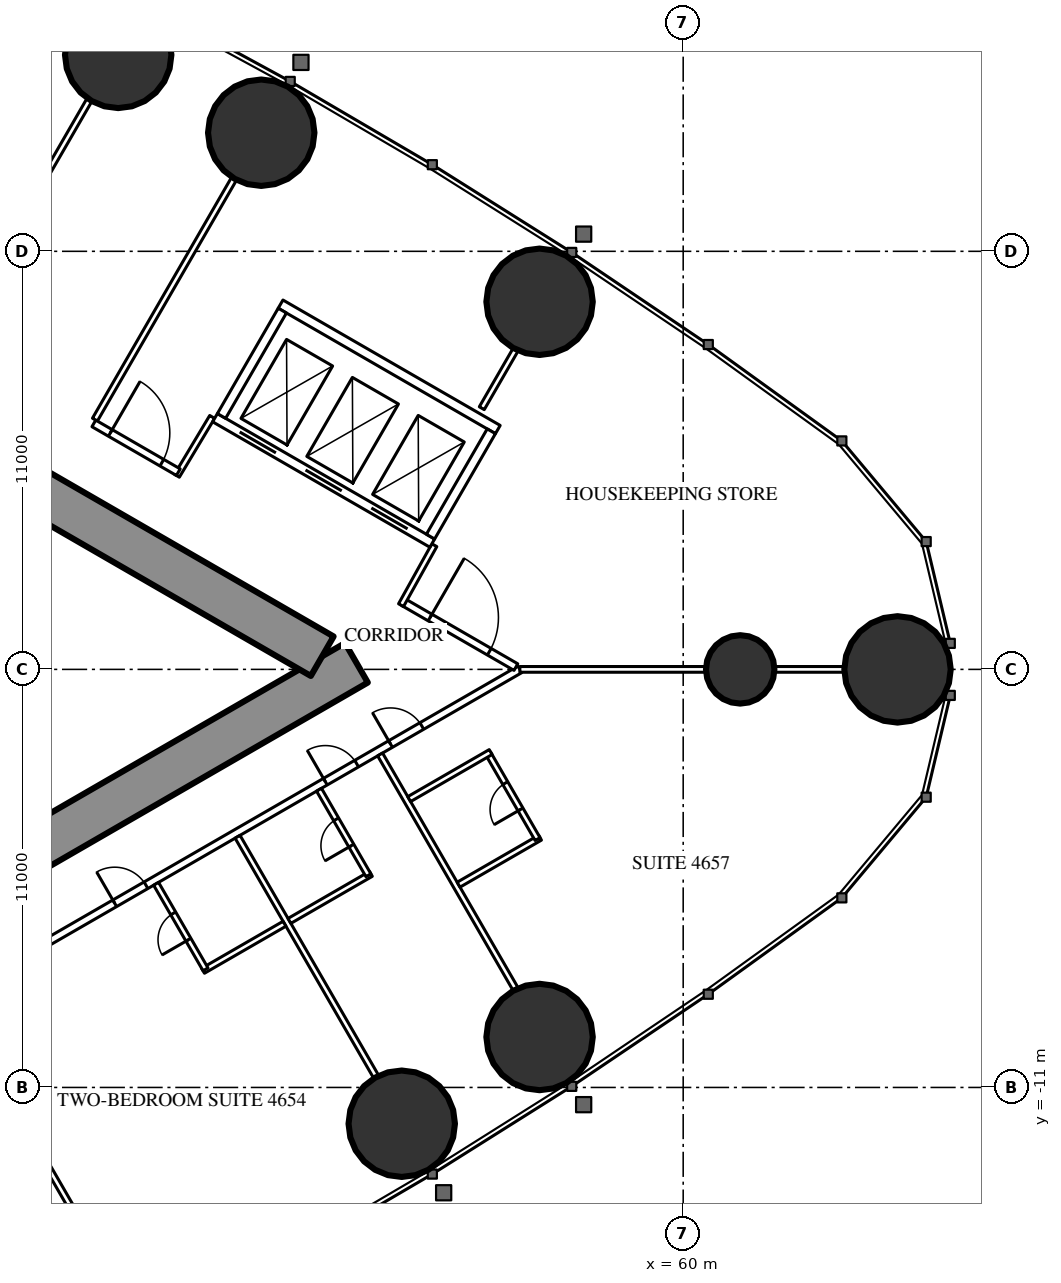
"""IFC4 building model, lengths in metres.
Left out: names, types, materials, properties, quantities, classifications, styles, units other than length and angle.
Written with IfcOpenShell. Run it as: python <this file> out.ifc"""

import sys

from ifc_helpers import new_model, si_unit, direction, frame, frame_2d, origin, origin_2d, place, context, subcontext, project, spatial, rectangle, circle, extrude, element, fill, save


model = new_model("IFC4")
c1 = context("Model", 3, precision=1e-05, world=origin(), true_north=direction((0.0, 1.0)))
c2 = subcontext(c1, "Body", "Model", "MODEL_VIEW")
j1 = project(units=[si_unit("LENGTHUNIT", "METRE"), si_unit("PLANEANGLEUNIT", "RADIAN")], contexts=[c1])
p1 = place(None, origin())
s1 = spatial("IfcSite", under=j1, at=p1, CompositionType="ELEMENT")
p2 = place(p1, origin())
s2 = spatial("IfcBuilding", under=s1, at=p2, CompositionType="ELEMENT")
p3 = place(p2, frame((0.0, 0.0, 173.8)))
s3 = spatial("IfcBuildingStorey", under=s2, at=p3, CompositionType="ELEMENT", Elevation=173.8)
for number, where, z_axis, x_axis in (
    (1, (65.64, 0.0, 0.0), (0.0, 0.0, 1.0), (1.0, 0.0, 0.0)),
    (2, (56.221, 9.672, 0.0), (0.0, 0.0, 1.0), (1.0, 0.0, 0.0)),
    (3, (48.897, 14.121, 0.0), (0.0, 0.0, 1.0), (1.0, 0.0, 0.0)),
    (4, (45.134, 16.168, 0.0), (0.0, 0.0, 1.0), (1.0, 0.0, 0.0)),
    (5, (52.594, -11.955, 0.0), (0.0, 0.0, 1.0), (1.0, 0.0, 0.0)),
    (6, (56.221, -9.672, 0.0), (0.0, 0.0, 1.0), (1.0, 0.0, 0.0)),
):
    element("IfcColumn", number, at=place(p3, frame(where, z_axis=z_axis, x_axis=x_axis)), inside=s3, PredefinedType="COLUMN", context=c2, shape_type="SweptSolid", body=[
        extrude(circle(Radius=1.4, at=origin_2d()), origin(), (0.0, 0.0, 1.0), 3.5),
    ])
p4 = place(p3, frame((61.5, 0.0, 0.0), z_axis=(0.0, 0.0, 1.0), x_axis=(1.0, 0.0, 0.0)))
e7 = element("IfcColumn", 7, at=p4, inside=s3, PredefinedType="COLUMN", context=c2, shape_type="SweptSolid", body=[
    extrude(circle(Radius=0.9, at=origin_2d()), origin(), (0.0, 0.0, 1.0), 3.5),
])
p5 = place(p3, frame((27.2, -13.8, 0.0), z_axis=(0.0, 0.0, 1.0), x_axis=(0.866027159892, 0.499996958321, 0.0)))
e8 = element("IfcWall", 8, at=p5, inside=s3, PredefinedType="SHEAR", context=c2, shape_type="SweptSolid", body=[
    extrude(rectangle(XDim=27.947, YDim=1.2, at=frame_2d((13.973, 0.0))), origin(), (0.0, 0.0, 1.0), 3.5),
])
p6 = place(p5, frame((4.6, 0.0, 0.0)))
e9 = element("IfcOpeningElement", 9, at=p6, cuts=e8, PredefinedType="OPENING", context=c2, shape_type="SweptSolid", body=[
    extrude(rectangle(XDim=1.0, YDim=2.2, at=frame_2d((0.5, 1.1))), frame((0.0, 0.61, 0.0), z_axis=(0.0, -1.0, 0.0), x_axis=(1.0, 0.0, 0.0)), (0.0, 0.0, 1.0), 1.22),
])
p7 = place(p5, frame((13.395, 0.0, 0.0)))
e10 = element("IfcOpeningElement", 10, at=p7, cuts=e8, PredefinedType="OPENING", context=c2, shape_type="SweptSolid", body=[
    extrude(rectangle(XDim=1.8, YDim=2.2, at=frame_2d((0.9, 1.1))), frame((0.0, 0.61, 0.0), z_axis=(0.0, -1.0, 0.0), x_axis=(1.0, 0.0, 0.0)), (0.0, 0.0, 1.0), 1.22),
])
p8 = place(p3, frame((27.2, 13.8, 0.0), z_axis=(0.0, 0.0, 1.0), x_axis=(0.866024515034, -0.500001539357, 0.0)))
e11 = element("IfcWall", 11, at=p8, inside=s3, PredefinedType="SHEAR", context=c2, shape_type="SweptSolid", body=[
    extrude(rectangle(XDim=26.907, YDim=1.2, at=frame_2d((13.454, 0.0))), origin(), (0.0, 0.0, 1.0), 3.5),
])
p9 = place(p8, frame((4.6, 0.0, 0.0)))
e12 = element("IfcOpeningElement", 12, at=p9, cuts=e11, PredefinedType="OPENING", context=c2, shape_type="SweptSolid", body=[
    extrude(rectangle(XDim=1.0, YDim=2.2, at=frame_2d((0.5, 1.1))), frame((0.0, 0.61, 0.0), z_axis=(0.0, -1.0, 0.0), x_axis=(1.0, 0.0, 0.0)), (0.0, 0.0, 1.0), 1.22),
])
p10 = place(p8, frame((13.395, 0.0, 0.0)))
e13 = element("IfcOpeningElement", 13, at=p10, cuts=e11, PredefinedType="OPENING", context=c2, shape_type="SweptSolid", body=[
    extrude(rectangle(XDim=1.8, YDim=2.2, at=frame_2d((0.9, 1.1))), frame((0.0, 0.61, 0.0), z_axis=(0.0, -1.0, 0.0), x_axis=(1.0, 0.0, 0.0)), (0.0, 0.0, 1.0), 1.22),
])
p11 = place(p3, frame((27.959, -16.017, 0.0), z_axis=(0.0, 0.0, 1.0), x_axis=(0.866024151371, 0.500002169237, 0.0)))
e14 = element("IfcWall", 14, at=p11, inside=s3, PredefinedType="PARTITIONING", context=c2, shape_type="SweptSolid", body=[
    extrude(rectangle(XDim=32.034, YDim=0.2, at=frame_2d((16.017, 0.0))), origin(), (0.0, 0.0, 1.0), 3.25),
])
p12 = place(p11, frame((4.765, 0.0, 0.0)))
e15 = element("IfcOpeningElement", 15, at=p12, cuts=e14, PredefinedType="OPENING", context=c2, shape_type="SweptSolid", body=[
    extrude(rectangle(XDim=0.95, YDim=2.2, at=frame_2d((0.475, 1.1))), frame((0.0, 0.11, 0.0), z_axis=(0.0, -1.0, 0.0), x_axis=(1.0, 0.0, 0.0)), (0.0, 0.0, 1.0), 0.22),
])
p13 = place(p11, frame((9.215, 0.0, 0.0)))
e16 = element("IfcOpeningElement", 16, at=p13, cuts=e14, PredefinedType="OPENING", context=c2, shape_type="SweptSolid", body=[
    extrude(rectangle(XDim=1.0, YDim=2.2, at=frame_2d((0.5, 1.1))), frame((0.0, 0.11, 0.0), z_axis=(0.0, -1.0, 0.0), x_axis=(1.0, 0.0, 0.0)), (0.0, 0.0, 1.0), 0.22),
])
p14 = place(p11, frame((19.725, 0.0, 0.0)))
e17 = element("IfcOpeningElement", 17, at=p14, cuts=e14, PredefinedType="OPENING", context=c2, shape_type="SweptSolid", body=[
    extrude(rectangle(XDim=0.95, YDim=2.2, at=frame_2d((0.475, 1.1))), frame((0.0, 0.11, 0.0), z_axis=(0.0, -1.0, 0.0), x_axis=(1.0, 0.0, 0.0)), (0.0, 0.0, 1.0), 0.22),
])
p15 = place(p11, frame((26.125, 0.0, 0.0)))
e18 = element("IfcOpeningElement", 18, at=p15, cuts=e14, PredefinedType="OPENING", context=c2, shape_type="SweptSolid", body=[
    extrude(rectangle(XDim=0.95, YDim=2.2, at=frame_2d((0.475, 1.1))), frame((0.0, 0.11, 0.0), z_axis=(0.0, -1.0, 0.0), x_axis=(1.0, 0.0, 0.0)), (0.0, 0.0, 1.0), 0.22),
])
p16 = place(p11, frame((28.106, 0.0, 0.0)))
e19 = element("IfcOpeningElement", 19, at=p16, cuts=e14, PredefinedType="OPENING", context=c2, shape_type="SweptSolid", body=[
    extrude(rectangle(XDim=0.95, YDim=2.2, at=frame_2d((0.475, 1.1))), frame((0.0, 0.11, 0.0), z_axis=(0.0, -1.0, 0.0), x_axis=(1.0, 0.0, 0.0)), (0.0, 0.0, 1.0), 0.22),
])
p17 = place(p3, frame((40.769, -8.737, 0.0), z_axis=(0.0, 0.0, 1.0), x_axis=(0.500013115284, -0.866017831539, 0.0)))
e20 = element("IfcWall", 20, at=p17, inside=s3, PredefinedType="PARTITIONING", context=c2, shape_type="SweptSolid", body=[
    extrude(rectangle(XDim=7.198, YDim=0.15, at=frame_2d((3.599, 0.0))), origin(), (0.0, 0.0, 1.0), 2.3),
])
p18 = place(p3, frame((48.275, -4.404, 0.0), z_axis=(0.0, 0.0, 1.0), x_axis=(0.500006004368, -0.866021937133, 0.0)))
e21 = element("IfcWall", 21, at=p18, inside=s3, PredefinedType="PARTITIONING", context=c2, shape_type="SweptSolid", body=[
    extrude(rectangle(XDim=7.279, YDim=0.15, at=frame_2d((3.64, 0.0))), origin(), (0.0, 0.0, 1.0), 2.3),
])
p19 = place(p3, frame((52.025, -2.238, 0.0), z_axis=(0.0, 0.0, 1.0), x_axis=(0.499983785035, -0.866034765296, 0.0)))
e22 = element("IfcWall", 22, at=p19, inside=s3, PredefinedType="PARTITIONING", context=c2, shape_type="SweptSolid", body=[
    extrude(rectangle(XDim=7.116, YDim=0.15, at=frame_2d((3.558, 0.0))), origin(), (0.0, 0.0, 1.0), 2.3),
])
p20 = place(p3, frame((40.769, 8.737, 0.0), z_axis=(0.0, 0.0, 1.0), x_axis=(0.500013115284, 0.866017831539, 0.0)))
e23 = element("IfcWall", 23, at=p20, inside=s3, PredefinedType="PARTITIONING", context=c2, shape_type="SweptSolid", body=[
    extrude(rectangle(XDim=7.198, YDim=0.15, at=frame_2d((3.599, 0.0))), origin(), (0.0, 0.0, 1.0), 2.3),
])
p21 = place(p3, frame((44.521, 6.571, 0.0), z_axis=(0.0, 0.0, 1.0), x_axis=(0.500020376429, 0.866013639128, 0.0)))
e24 = element("IfcWall", 24, at=p21, inside=s3, PredefinedType="PARTITIONING", context=c2, shape_type="SweptSolid", body=[
    extrude(rectangle(XDim=7.306, YDim=0.15, at=frame_2d((3.653, 0.0))), origin(), (0.0, 0.0, 1.0), 2.3),
])
p22 = place(p3, frame((55.702, 0.0, 0.0), z_axis=(0.0, 0.0, 1.0), x_axis=(1.0, 0.0, 0.0)))
e25 = element("IfcWall", 25, at=p22, inside=s3, PredefinedType="PARTITIONING", context=c2, shape_type="SweptSolid", body=[
    extrude(rectangle(XDim=8.518, YDim=0.15, at=frame_2d((4.259, 0.0))), origin(), (0.0, 0.0, 1.0), 2.3),
])
p23 = place(p3, frame((54.7, 6.872, 0.0), z_axis=(0.0, 0.0, 1.0), x_axis=(0.499989690894, 0.866031355668, 0.0)))
e26 = element("IfcWall", 26, at=p23, inside=s3, PredefinedType="PARTITIONING", context=c2, shape_type="SweptSolid", body=[
    extrude(rectangle(XDim=1.766, YDim=0.15, at=frame_2d((0.883, 0.0))), origin(), (0.0, 0.0, 1.0), 3.25),
])
p24 = place(p3, frame((52.639, 1.769, 0.0), z_axis=(0.0, 0.0, 1.0), x_axis=(0.866027340901, -0.4999966448, 0.0)))
e27 = element("IfcWall", 27, at=p24, inside=s3, PredefinedType="PARTITIONING", context=c2, shape_type="SweptSolid", body=[
    extrude(rectangle(XDim=3.417, YDim=0.2, at=frame_2d((1.708, 0.0))), origin(), (0.0, 0.0, 1.0), 3.25),
])
p25 = place(p24, frame((0.809, 0.0, 0.0)))
e28 = element("IfcOpeningElement", 28, at=p25, cuts=e27, PredefinedType="OPENING", context=c2, shape_type="SweptSolid", body=[
    extrude(rectangle(XDim=1.8, YDim=2.2, at=frame_2d((0.9, 1.1))), frame((0.0, 0.11, 0.0), z_axis=(0.0, -1.0, 0.0), x_axis=(1.0, 0.0, 0.0)), (0.0, 0.0, 1.0), 0.22),
])
p26 = place(p3, frame((52.576, 1.689, 0.0), z_axis=(0.0, 0.0, 1.0), x_axis=(0.485424724123, 0.874278466629, 0.0)))
e29 = element("IfcWall", 29, at=p26, inside=s3, PredefinedType="PARTITIONING", context=c2, shape_type="SweptSolid", body=[
    extrude(rectangle(XDim=1.805, YDim=0.15, at=frame_2d((0.903, 0.0))), origin(), (0.0, 0.0, 1.0), 3.25),
])
p27 = place(p3, frame((47.606, 6.643, 0.0), z_axis=(0.0, 0.0, 1.0), x_axis=(-0.514237157483, -0.857648031458, 0.0)))
e30 = element("IfcWall", 30, at=p27, inside=s3, PredefinedType="PARTITIONING", context=c2, shape_type="SweptSolid", body=[
    extrude(rectangle(XDim=1.805, YDim=0.15, at=frame_2d((0.902, 0.0))), origin(), (0.0, 0.0, 1.0), 3.25),
])
p28 = place(p3, frame((44.493, 6.472, 0.0), z_axis=(0.0, 0.0, 1.0), x_axis=(0.866027140358, -0.499996992154, 0.0)))
e31 = element("IfcWall", 31, at=p28, inside=s3, PredefinedType="PARTITIONING", context=c2, shape_type="SweptSolid", body=[
    extrude(rectangle(XDim=2.566, YDim=0.2, at=frame_2d((1.283, 0.0))), origin(), (0.0, 0.0, 1.0), 3.25),
])
p29 = place(p28, frame((0.5, 0.0, 0.0)))
e32 = element("IfcOpeningElement", 32, at=p29, cuts=e31, PredefinedType="OPENING", context=c2, shape_type="SweptSolid", body=[
    extrude(rectangle(XDim=1.566, YDim=2.2, at=frame_2d((0.783, 1.1))), frame((0.0, 0.11, 0.0), z_axis=(0.0, -1.0, 0.0), x_axis=(1.0, 0.0, 0.0)), (0.0, 0.0, 1.0), 0.22),
])
p30 = place(p3, frame((47.366, -7.93, 0.0), z_axis=(0.0, 0.0, 1.0), x_axis=(0.866031185235, 0.4999899861, 0.0)))
e33 = element("IfcWall", 33, at=p30, inside=s3, PredefinedType="PARTITIONING", context=c2, shape_type="SweptSolid", body=[
    extrude(rectangle(XDim=2.475, YDim=0.15, at=frame_2d((1.238, 0.0))), origin(), (0.0, 0.0, 1.0), 3.25),
])
p31 = place(p3, frame((46.131, -5.641, 0.0), z_axis=(0.0, 0.0, 1.0), x_axis=(0.49997716683, -0.86603858612, 0.0)))
e34 = element("IfcWall", 34, at=p31, inside=s3, PredefinedType="PARTITIONING", context=c2, shape_type="SweptSolid", body=[
    extrude(rectangle(XDim=2.6, YDim=0.15, at=frame_2d((1.3, 0.0))), origin(), (0.0, 0.0, 1.0), 3.25),
])
p32 = place(p31, frame((0.9, 0.0, 0.0)))
e35 = element("IfcOpeningElement", 35, at=p32, cuts=e34, PredefinedType="OPENING", context=c2, shape_type="SweptSolid", body=[
    extrude(rectangle(XDim=0.8, YDim=2.2, at=frame_2d((0.4, 1.1))), frame((0.0, 0.085, 0.0), z_axis=(0.0, -1.0, 0.0), x_axis=(1.0, 0.0, 0.0)), (0.0, 0.0, 1.0), 0.17),
])
p33 = place(p3, frame((49.64, -6.618, 0.0), z_axis=(0.0, 0.0, 1.0), x_axis=(0.866006523861, 0.500032699561, 0.0)))
e36 = element("IfcWall", 36, at=p33, inside=s3, PredefinedType="PARTITIONING", context=c2, shape_type="SweptSolid", body=[
    extrude(rectangle(XDim=2.475, YDim=0.15, at=frame_2d((1.237, 0.0))), origin(), (0.0, 0.0, 1.0), 3.25),
])
p34 = place(p3, frame((50.418, -3.166, 0.0), z_axis=(0.0, 0.0, 1.0), x_axis=(0.499936506574, -0.866062058628, 0.0)))
e37 = element("IfcWall", 37, at=p34, inside=s3, PredefinedType="PARTITIONING", context=c2, shape_type="SweptSolid", body=[
    extrude(rectangle(XDim=2.6, YDim=0.15, at=frame_2d((1.3, 0.0))), origin(), (0.0, 0.0, 1.0), 3.25),
])
p35 = place(p34, frame((0.9, 0.0, 0.0)))
e38 = element("IfcOpeningElement", 38, at=p35, cuts=e37, PredefinedType="OPENING", context=c2, shape_type="SweptSolid", body=[
    extrude(rectangle(XDim=0.8, YDim=2.2, at=frame_2d((0.4, 1.1))), frame((0.0, 0.085, 0.0), z_axis=(0.0, -1.0, 0.0), x_axis=(1.0, 0.0, 0.0)), (0.0, 0.0, 1.0), 0.17),
])
p36 = place(p3, frame((54.09, -5.665, 0.0), z_axis=(0.0, 0.0, 1.0), x_axis=(0.866006523861, 0.500032699561, 0.0)))
e39 = element("IfcWall", 39, at=p36, inside=s3, PredefinedType="PARTITIONING", context=c2, shape_type="SweptSolid", body=[
    extrude(rectangle(XDim=2.475, YDim=0.15, at=frame_2d((1.237, 0.0))), origin(), (0.0, 0.0, 1.0), 3.25),
])
p37 = place(p3, frame((54.869, -2.213, 0.0), z_axis=(0.0, 0.0, 1.0), x_axis=(0.500047596559, -0.865997922154, 0.0)))
e40 = element("IfcWall", 40, at=p37, inside=s3, PredefinedType="PARTITIONING", context=c2, shape_type="SweptSolid", body=[
    extrude(rectangle(XDim=2.6, YDim=0.15, at=frame_2d((1.3, 0.0))), origin(), (0.0, 0.0, 1.0), 3.25),
])
p38 = place(p37, frame((0.9, 0.0, 0.0)))
e41 = element("IfcOpeningElement", 41, at=p38, cuts=e40, PredefinedType="OPENING", context=c2, shape_type="SweptSolid", body=[
    extrude(rectangle(XDim=0.8, YDim=2.2, at=frame_2d((0.4, 1.1))), frame((0.0, 0.085, 0.0), z_axis=(0.0, -1.0, 0.0), x_axis=(1.0, 0.0, 0.0)), (0.0, 0.0, 1.0), 0.17),
])
p39 = place(p3, frame((52.79, -3.413, 0.0), z_axis=(0.0, 0.0, 1.0), x_axis=(0.866006523861, 0.500032699561, 0.0)))
e42 = element("IfcWall", 42, at=p39, inside=s3, PredefinedType="PARTITIONING", context=c2, shape_type="SweptSolid", body=[
    extrude(rectangle(XDim=2.475, YDim=0.15, at=frame_2d((1.237, 0.0))), origin(), (0.0, 0.0, 1.0), 3.25),
])
p40 = place(p3, frame((47.681, 6.622, 0.0), z_axis=(0.0, 0.0, 1.0), x_axis=(0.86603344179, -0.499986077507, 0.0)))
e43 = element("IfcWall", 43, at=p40, inside=s3, PredefinedType="PARTITIONING", context=c2, shape_type="SweptSolid", body=[
    extrude(rectangle(XDim=6.6, YDim=0.25, at=frame_2d((3.3, 0.0))), origin(), (0.0, 0.0, 1.0), 3.25),
])
p41 = place(p40, frame((0.75, 0.0, 0.0)))
e44 = element("IfcOpeningElement", 44, at=p41, cuts=e43, PredefinedType="OPENING", context=c2, shape_type="SweptSolid", body=[
    extrude(rectangle(XDim=1.1, YDim=2.2, at=frame_2d((0.55, 1.1))), frame((0.0, 0.135, 0.0), z_axis=(0.0, -1.0, 0.0), x_axis=(1.0, 0.0, 0.0)), (0.0, 0.0, 1.0), 0.27),
])
p42 = place(p40, frame((2.75, 0.0, 0.0)))
e45 = element("IfcOpeningElement", 45, at=p42, cuts=e43, PredefinedType="OPENING", context=c2, shape_type="SweptSolid", body=[
    extrude(rectangle(XDim=1.1, YDim=2.2, at=frame_2d((0.55, 1.1))), frame((0.0, 0.135, 0.0), z_axis=(0.0, -1.0, 0.0), x_axis=(1.0, 0.0, 0.0)), (0.0, 0.0, 1.0), 0.27),
])
p43 = place(p40, frame((4.75, 0.0, 0.0)))
e46 = element("IfcOpeningElement", 46, at=p43, cuts=e43, PredefinedType="OPENING", context=c2, shape_type="SweptSolid", body=[
    extrude(rectangle(XDim=1.1, YDim=2.2, at=frame_2d((0.55, 1.1))), frame((0.0, 0.135, 0.0), z_axis=(0.0, -1.0, 0.0), x_axis=(1.0, 0.0, 0.0)), (0.0, 0.0, 1.0), 0.27),
])
p44 = place(p3, frame((49.406, 9.611, 0.0), z_axis=(0.0, 0.0, 1.0), x_axis=(0.86603344179, -0.499986077507, 0.0)))
e47 = element("IfcWall", 47, at=p44, inside=s3, PredefinedType="PARTITIONING", context=c2, shape_type="SweptSolid", body=[
    extrude(rectangle(XDim=6.6, YDim=0.25, at=frame_2d((3.3, 0.0))), origin(), (0.0, 0.0, 1.0), 3.25),
])
p45 = place(p3, frame((47.852, 6.668, 0.0), z_axis=(0.0, 0.0, 1.0), x_axis=(0.499929347863, 0.866066190972, 0.0)))
e48 = element("IfcWall", 48, at=p45, inside=s3, PredefinedType="PARTITIONING", context=c2, shape_type="SweptSolid", body=[
    extrude(rectangle(XDim=3.201, YDim=0.25, at=frame_2d((1.6, 0.0))), origin(), (0.0, 0.0, 1.0), 3.25),
])
p46 = place(p3, frame((53.352, 3.493, 0.0), z_axis=(0.0, 0.0, 1.0), x_axis=(0.499872130319, 0.866099216793, 0.0)))
e49 = element("IfcWall", 49, at=p46, inside=s3, PredefinedType="PARTITIONING", context=c2, shape_type="SweptSolid", body=[
    extrude(rectangle(XDim=3.2, YDim=0.25, at=frame_2d((1.6, 0.0))), origin(), (0.0, 0.0, 1.0), 3.25),
])
p47 = place(p32, origin())
e50 = element("IfcDoor", 50, at=p47, inside=s3, OperationType="SINGLE_SWING_RIGHT", PredefinedType="DOOR", context=c2, shape_type="SweptSolid", body=[
    extrude(rectangle(XDim=0.8, YDim=2.2, at=frame_2d((0.4, 1.1))), frame((0.0, 0.025, 0.0), z_axis=(0.0, -1.0, 0.0), x_axis=(1.0, 0.0, 0.0)), (0.0, 0.0, 1.0), 0.05),
])
fill(e35, e50)
p48 = place(p14, origin())
e51 = element("IfcDoor", 51, at=p48, inside=s3, OperationType="SINGLE_SWING_LEFT", PredefinedType="DOOR", context=c2, shape_type="SweptSolid", body=[
    extrude(rectangle(XDim=0.95, YDim=2.2, at=frame_2d((0.475, 1.1))), frame((0.0, 0.025, 0.0), z_axis=(0.0, -1.0, 0.0), x_axis=(1.0, 0.0, 0.0)), (0.0, 0.0, 1.0), 0.05),
])
fill(e17, e51)
p49 = place(p35, origin())
e52 = element("IfcDoor", 52, at=p49, inside=s3, OperationType="SINGLE_SWING_RIGHT", PredefinedType="DOOR", context=c2, shape_type="SweptSolid", body=[
    extrude(rectangle(XDim=0.8, YDim=2.2, at=frame_2d((0.4, 1.1))), frame((0.0, 0.025, 0.0), z_axis=(0.0, -1.0, 0.0), x_axis=(1.0, 0.0, 0.0)), (0.0, 0.0, 1.0), 0.05),
])
fill(e38, e52)
p50 = place(p15, origin())
e53 = element("IfcDoor", 53, at=p50, inside=s3, OperationType="SINGLE_SWING_LEFT", PredefinedType="DOOR", context=c2, shape_type="SweptSolid", body=[
    extrude(rectangle(XDim=0.95, YDim=2.2, at=frame_2d((0.475, 1.1))), frame((0.0, 0.025, 0.0), z_axis=(0.0, -1.0, 0.0), x_axis=(1.0, 0.0, 0.0)), (0.0, 0.0, 1.0), 0.05),
])
fill(e18, e53)
p51 = place(p38, origin())
e54 = element("IfcDoor", 54, at=p51, inside=s3, OperationType="SINGLE_SWING_RIGHT", PredefinedType="DOOR", context=c2, shape_type="SweptSolid", body=[
    extrude(rectangle(XDim=0.8, YDim=2.2, at=frame_2d((0.4, 1.1))), frame((0.0, 0.025, 0.0), z_axis=(0.0, -1.0, 0.0), x_axis=(1.0, 0.0, 0.0)), (0.0, 0.0, 1.0), 0.05),
])
fill(e41, e54)
p52 = place(p16, origin())
e55 = element("IfcDoor", 55, at=p52, inside=s3, OperationType="SINGLE_SWING_LEFT", PredefinedType="DOOR", context=c2, shape_type="SweptSolid", body=[
    extrude(rectangle(XDim=0.95, YDim=2.2, at=frame_2d((0.475, 1.1))), frame((0.0, 0.025, 0.0), z_axis=(0.0, -1.0, 0.0), x_axis=(1.0, 0.0, 0.0)), (0.0, 0.0, 1.0), 0.05),
])
fill(e19, e55)
p53 = place(p25, origin())
e56 = element("IfcDoor", 56, at=p53, inside=s3, OperationType="DOUBLE_DOOR_SINGLE_SWING", PredefinedType="DOOR", context=c2, shape_type="SweptSolid", body=[
    extrude(rectangle(XDim=1.8, YDim=2.2, at=frame_2d((0.9, 1.1))), frame((0.0, 0.025, 0.0), z_axis=(0.0, -1.0, 0.0), x_axis=(1.0, 0.0, 0.0)), (0.0, 0.0, 1.0), 0.05),
])
fill(e28, e56)
p54 = place(p29, origin())
e57 = element("IfcDoor", 57, at=p54, inside=s3, OperationType="SINGLE_SWING_LEFT", PredefinedType="DOOR", context=c2, shape_type="SweptSolid", body=[
    extrude(rectangle(XDim=1.566, YDim=2.2, at=frame_2d((0.783, 1.1))), frame((0.0, 0.025, 0.0), z_axis=(0.0, -1.0, 0.0), x_axis=(1.0, 0.0, 0.0)), (0.0, 0.0, 1.0), 0.05),
])
fill(e32, e57)
p55 = place(p41, origin())
e58 = element("IfcDoor", 58, at=p55, inside=s3, OperationType="DOUBLE_DOOR_SLIDING", PredefinedType="USERDEFINED", context=c2, shape_type="SweptSolid", body=[
    extrude(rectangle(XDim=1.1, YDim=2.2, at=frame_2d((0.55, 1.1))), frame((0.0, 0.025, 0.0), z_axis=(0.0, -1.0, 0.0), x_axis=(1.0, 0.0, 0.0)), (0.0, 0.0, 1.0), 0.05),
])
fill(e44, e58)
p56 = place(p42, origin())
e59 = element("IfcDoor", 59, at=p56, inside=s3, OperationType="DOUBLE_DOOR_SLIDING", PredefinedType="USERDEFINED", context=c2, shape_type="SweptSolid", body=[
    extrude(rectangle(XDim=1.1, YDim=2.2, at=frame_2d((0.55, 1.1))), frame((0.0, 0.025, 0.0), z_axis=(0.0, -1.0, 0.0), x_axis=(1.0, 0.0, 0.0)), (0.0, 0.0, 1.0), 0.05),
])
fill(e45, e59)
p57 = place(p43, origin())
e60 = element("IfcDoor", 60, at=p57, inside=s3, OperationType="DOUBLE_DOOR_SLIDING", PredefinedType="USERDEFINED", context=c2, shape_type="SweptSolid", body=[
    extrude(rectangle(XDim=1.1, YDim=2.2, at=frame_2d((0.55, 1.1))), frame((0.0, 0.025, 0.0), z_axis=(0.0, -1.0, 0.0), x_axis=(1.0, 0.0, 0.0)), (0.0, 0.0, 1.0), 0.05),
])
fill(e46, e60)
save(model, sys.argv[1])
